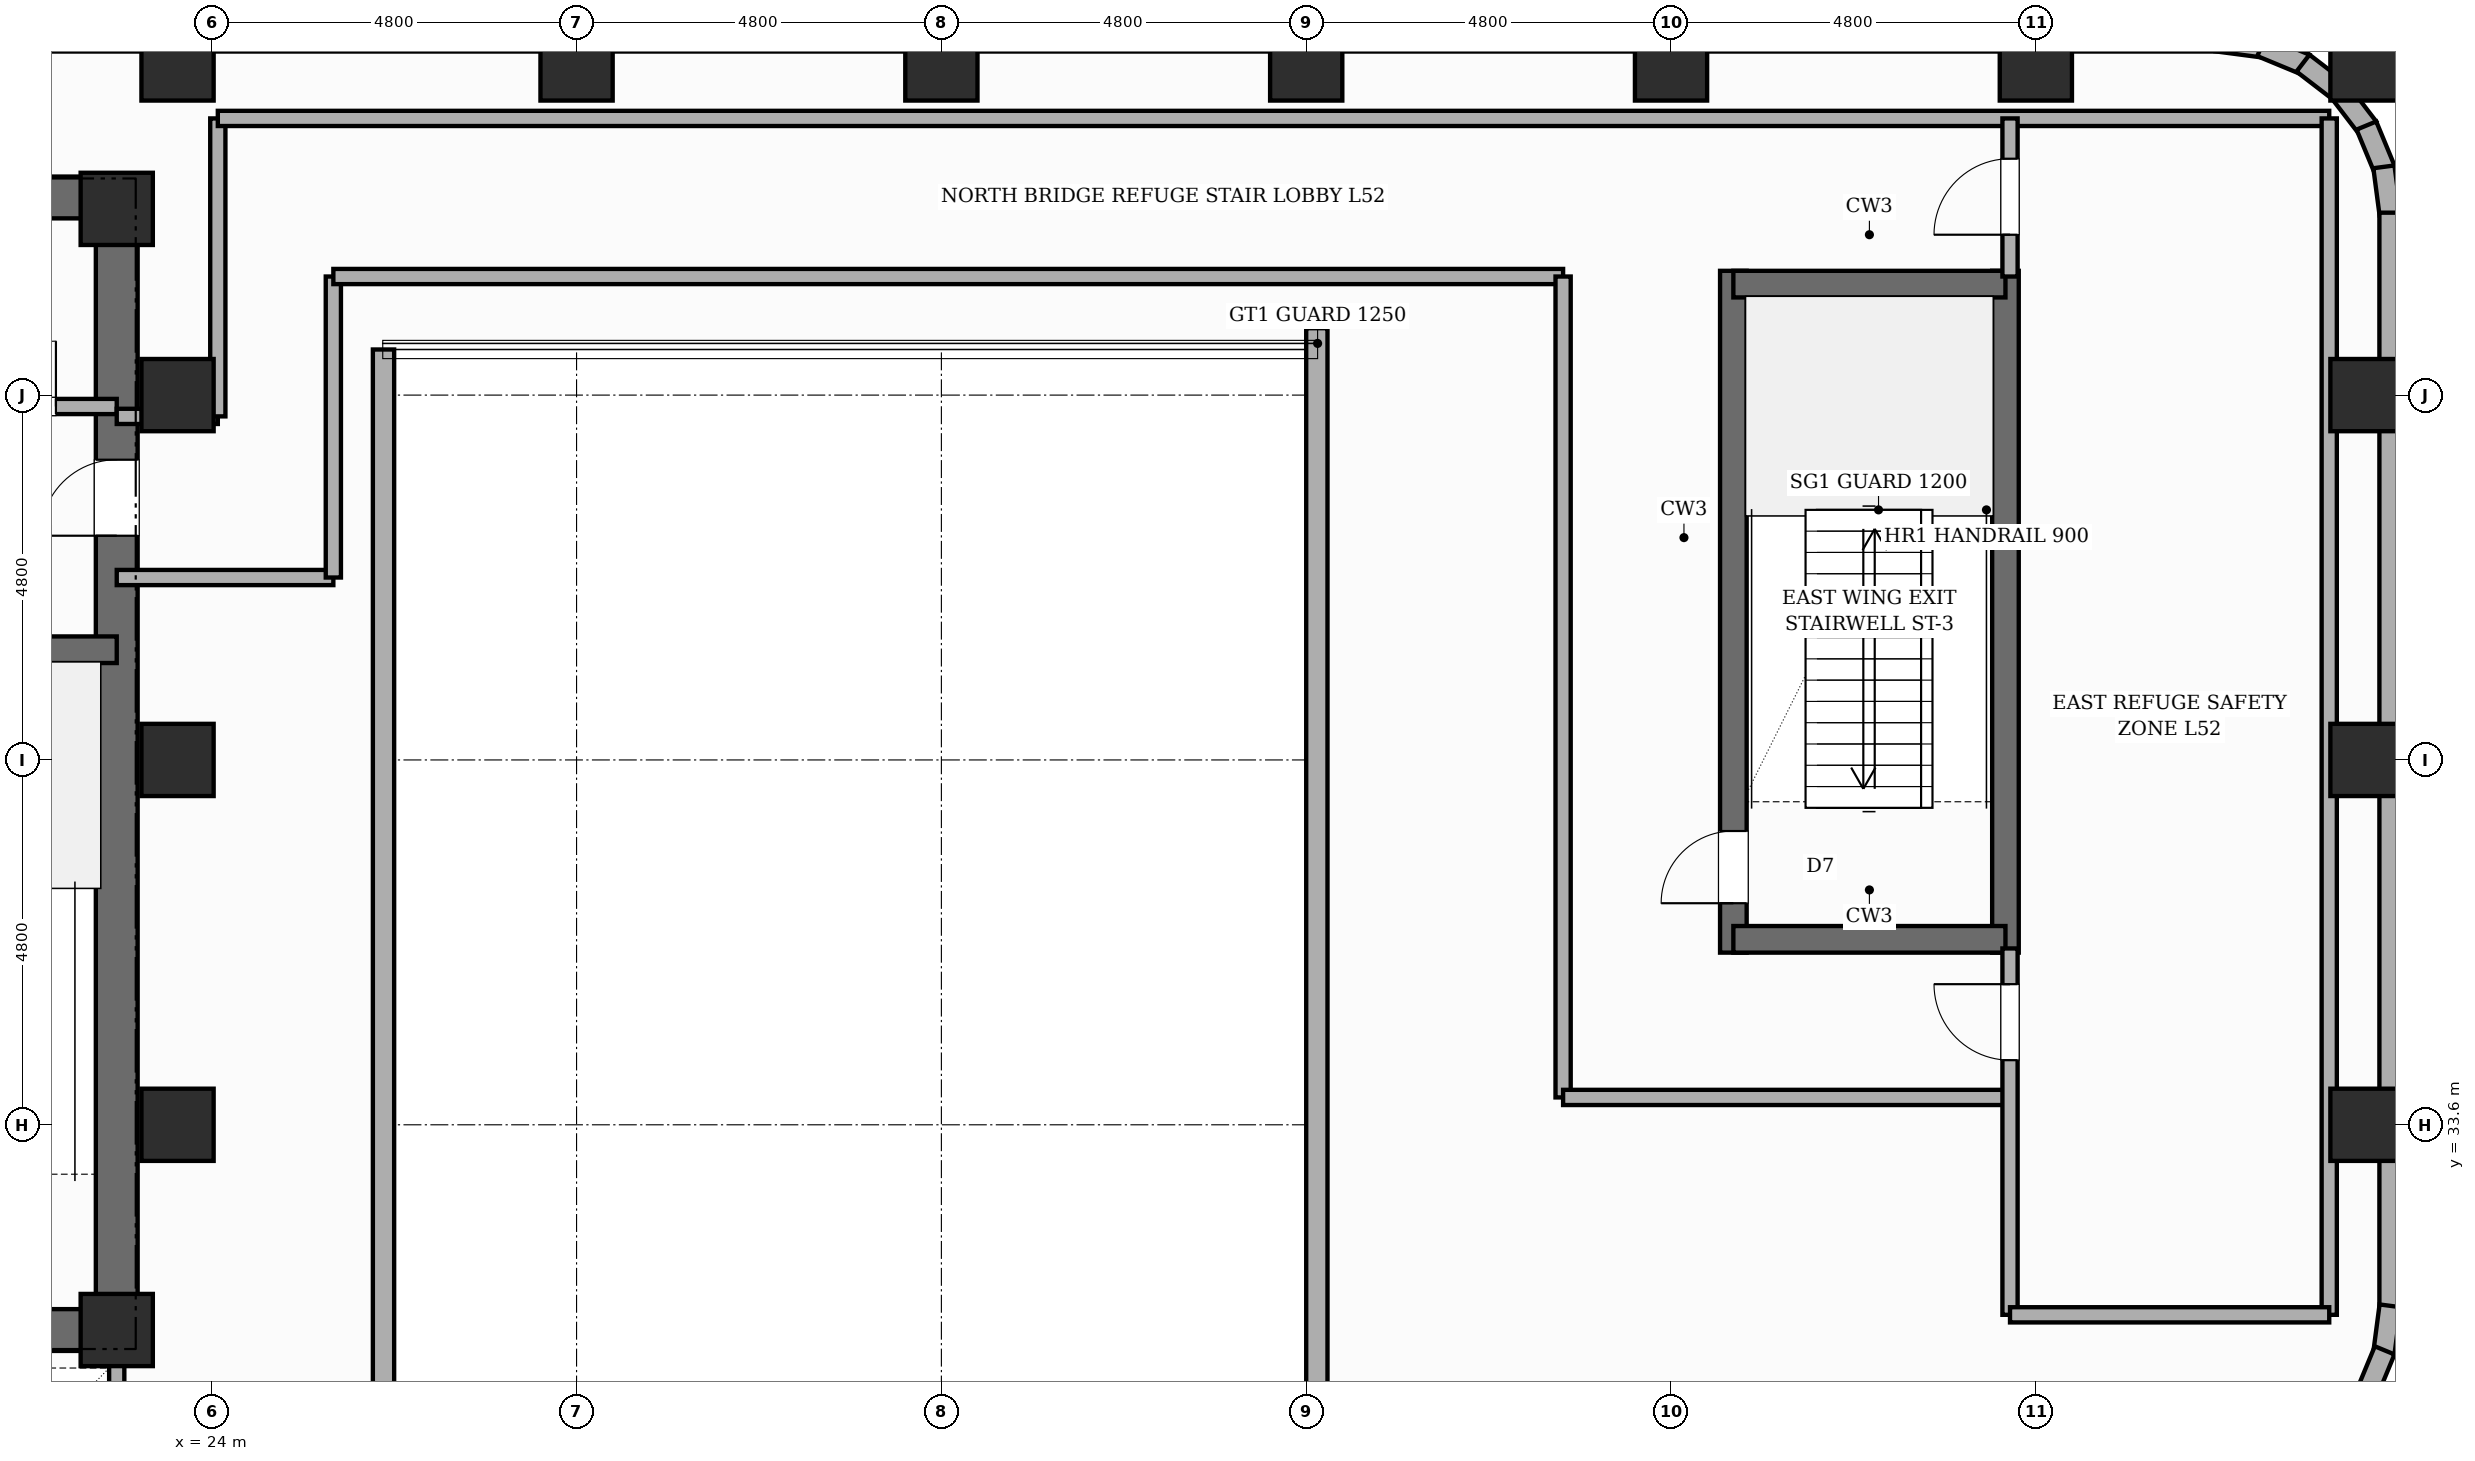
"""IFC4 building model, lengths in metres.
Left out: names, types, materials, properties, quantities, classifications, styles, units other than length and angle.
Written with IfcOpenShell. Run it as: python <this file> out.ifc"""

import sys

from ifc_helpers import new_model, si_unit, direction, frame, frame_2d, origin, origin_2d, place, context, subcontext, project, spatial, rectangle, extrude, element, fill, save


model = new_model("IFC4")
c1 = context("Model", 3, precision=1e-05, world=origin(), true_north=direction((0.0, 1.0)))
c2 = subcontext(c1, "Body", "Model", "MODEL_VIEW")
j1 = project(units=[si_unit("LENGTHUNIT", "METRE"), si_unit("PLANEANGLEUNIT", "RADIAN")], contexts=[c1])
p1 = place(None, origin())
s1 = spatial("IfcSite", under=j1, at=p1, CompositionType="ELEMENT")
p2 = place(p1, origin())
s2 = spatial("IfcBuilding", under=s1, at=p2, CompositionType="ELEMENT")
p3 = place(p2, frame((0.0, 0.0, 198.4)))
s3 = spatial("IfcBuildingStorey", under=s2, at=p3, CompositionType="ELEMENT", Elevation=198.4)
p4 = place(p3, frame((22.75, 30.625, 0.0), z_axis=(0.0, 0.0, 1.0), x_axis=(0.0, 1.0, 0.0)))
e1 = element("IfcWall", 1, at=p4, inside=s3, PredefinedType="SHEAR", context=c2, shape_type="SweptSolid", body=[
    extrude(rectangle(XDim=15.45, YDim=0.55, at=frame_2d((7.725, 0.0))), origin(), (0.0, 0.0, 1.0), 5.4),
])
p5 = place(p4, frame((10.725, 0.0, 0.0)))
e2 = element("IfcOpeningElement", 2, at=p5, cuts=e1, PredefinedType="OPENING", context=c2, shape_type="SweptSolid", body=[
    extrude(rectangle(XDim=1.0, YDim=2.15, at=frame_2d((0.5, 1.075))), frame((0.0, 0.285, 0.0), z_axis=(0.0, -1.0, 0.0), x_axis=(1.0, 0.0, 0.0)), (0.0, 0.0, 1.0), 0.57),
])
p6 = place(p3, frame((6.05, 45.8, 0.0), z_axis=(0.0, 0.0, 1.0), x_axis=(1.0, 0.0, 0.0)))
e3 = element("IfcWall", 3, at=p6, inside=s3, PredefinedType="SHEAR", context=c2, shape_type="SweptSolid", body=[
    extrude(rectangle(XDim=16.7, YDim=0.55, at=frame_2d((8.35, 0.0))), origin(), (0.0, 0.0, 1.0), 5.4),
])
p7 = place(p3, frame((18.84, 30.9, 0.0), z_axis=(0.0, 0.0, 1.0), x_axis=(1.0, 0.0, 0.0)))
e4 = element("IfcWall", 4, at=p7, inside=s3, PredefinedType="SHEAR", context=c2, shape_type="SweptSolid", body=[
    extrude(rectangle(XDim=3.91, YDim=0.55, at=frame_2d((1.955, 0.0))), origin(), (0.0, 0.0, 1.0), 5.4),
])
p8 = place(p3, frame((18.84, 39.85, 0.0), z_axis=(0.0, 0.0, 1.0), x_axis=(1.0, 0.0, 0.0)))
e5 = element("IfcWall", 5, at=p8, inside=s3, PredefinedType="SHEAR", context=c2, shape_type="SweptSolid", body=[
    extrude(rectangle(XDim=3.91, YDim=0.35, at=frame_2d((1.955, 0.0))), origin(), (0.0, 0.0, 1.0), 5.4),
])
p9 = place(p3, frame((44.02, 35.865, 0.0), z_axis=(0.0, 0.0, 1.0), x_axis=(0.0, 1.0, 0.0)))
e6 = element("IfcWall", 6, at=p9, inside=s3, PredefinedType="SHEAR", context=c2, shape_type="SweptSolid", body=[
    extrude(rectangle(XDim=8.97, YDim=0.35, at=frame_2d((4.485, 0.0))), origin(), (0.0, 0.0, 1.0), 5.4),
])
p10 = place(p9, frame((0.65, 0.0, 0.0)))
e7 = element("IfcOpeningElement", 7, at=p10, cuts=e6, PredefinedType="OPENING", context=c2, shape_type="SweptSolid", body=[
    extrude(rectangle(XDim=0.95, YDim=2.1, at=frame_2d((0.475, 1.05))), frame((0.0, 0.185, 0.0), z_axis=(0.0, -1.0, 0.0), x_axis=(1.0, 0.0, 0.0)), (0.0, 0.0, 1.0), 0.37),
])
p11 = place(p3, frame((47.6, 35.865, 0.0), z_axis=(0.0, 0.0, 1.0), x_axis=(0.0, 1.0, 0.0)))
e8 = element("IfcWall", 8, at=p11, inside=s3, PredefinedType="SHEAR", context=c2, shape_type="SweptSolid", body=[
    extrude(rectangle(XDim=8.97, YDim=0.35, at=frame_2d((4.485, 0.0))), origin(), (0.0, 0.0, 1.0), 5.4),
])
for number, where, z_axis, x_axis in (
    (9, (44.02, 36.04, 0.0), (0.0, 0.0, 1.0), (1.0, 0.0, 0.0)),
    (10, (44.02, 44.66, 0.0), (0.0, 0.0, 1.0), (1.0, 0.0, 0.0)),
):
    element("IfcWall", number, at=place(p3, frame(where, z_axis=z_axis, x_axis=x_axis)), inside=s3, PredefinedType="SHEAR", context=c2, shape_type="SweptSolid", body=[
        extrude(rectangle(XDim=3.58, YDim=0.35, at=frame_2d((1.79, 0.0))), origin(), (0.0, 0.0, 1.0), 5.4),
    ])
for number, where, z_axis, x_axis in (
    (11, (22.75, 30.9, 0.0), (0.0, 0.0, 1.0), (1.0, 0.0, 0.0)),
    (12, (22.75, 45.65, 0.0), (0.0, 0.0, 1.0), (1.0, 0.0, 0.0)),
    (13, (23.55, 33.6, 0.0), (0.0, 0.0, 1.0), (1.0, 0.0, 0.0)),
    (14, (23.55, 38.4, 0.0), (0.0, 0.0, 1.0), (1.0, 0.0, 0.0)),
    (15, (23.55, 43.2, 0.0), (0.0, 0.0, 1.0), (1.0, 0.0, 0.0)),
    (16, (23.55, 47.55, 0.0), (0.0, 0.0, 1.0), (1.0, 0.0, 0.0)),
    (17, (28.8, 47.55, 0.0), (0.0, 0.0, 1.0), (1.0, 0.0, 0.0)),
    (18, (33.6, 47.55, 0.0), (0.0, 0.0, 1.0), (1.0, 0.0, 0.0)),
    (19, (38.4, 47.55, 0.0), (0.0, 0.0, 1.0), (1.0, 0.0, 0.0)),
    (20, (43.2, 47.55, 0.0), (0.0, 0.0, 1.0), (1.0, 0.0, 0.0)),
    (21, (48.0, 47.55, 0.0), (0.0, 0.0, 1.0), (1.0, 0.0, 0.0)),
    (22, (52.35, 33.6, 0.0), (0.0, 0.0, 1.0), (1.0, 0.0, 0.0)),
    (23, (52.35, 38.4, 0.0), (0.0, 0.0, 1.0), (1.0, 0.0, 0.0)),
    (24, (52.35, 43.2, 0.0), (0.0, 0.0, 1.0), (1.0, 0.0, 0.0)),
    (25, (52.35, 47.55, 0.0), (0.0, 0.0, 1.0), (1.0, 0.0, 0.0)),
):
    element("IfcColumn", number, at=place(p3, frame(where, z_axis=z_axis, x_axis=x_axis)), inside=s3, PredefinedType="COLUMN", context=c2, shape_type="SweptSolid", body=[
        extrude(rectangle(XDim=0.95, YDim=0.95, at=origin_2d()), origin(), (0.0, 0.0, 1.0), 5.4),
    ])
p12 = place(p3, frame((50.382, 47.861, 0.0), z_axis=(0.0, 0.0, 1.0), x_axis=(0.991447664465, -0.130504898859, 0.0)))
e26 = element("IfcWall", 26, at=p12, inside=s3, PredefinedType="STANDARD", context=c2, shape_type="SweptSolid", body=[
    extrude(rectangle(XDim=0.627, YDim=0.28, at=frame_2d((0.313, 0.0))), origin(), (0.0, 0.0, 1.0), 4.46),
])
for number, where, z_axis, x_axis in (
    (27, (50.968, 47.789, 0.0), (0.0, 0.0, 1.0), (0.924, -0.382, 0.0)),
    (28, (51.515, 47.567, 0.0), (0.0, 0.0, 1.0), (0.793, -0.609, 0.0)),
    (29, (51.986, 47.212, 0.0), (0.0, 0.0, 1.0), (0.609, -0.793, 0.0)),
    (30, (52.349, 46.746, 0.0), (0.0, 0.0, 1.0), (0.383, -0.924, 0.0)),
    (31, (52.579, 46.203, 0.0), (0.0, 0.0, 1.0), (0.131, -0.991, 0.0)),
):
    element("IfcWall", number, at=place(p3, frame(where, z_axis=z_axis, x_axis=x_axis)), inside=s3, PredefinedType="STANDARD", context=c2, shape_type="SweptSolid", body=[
        extrude(rectangle(XDim=0.626, YDim=0.28, at=frame_2d((0.313, 0.0))), origin(), (0.0, 0.0, 1.0), 4.46),
    ])
p13 = place(p3, frame((52.66, 45.6, 0.0), z_axis=(0.0, 0.0, 1.0), x_axis=(0.0, -1.0, 0.0)))
e32 = element("IfcWall", 32, at=p13, inside=s3, PredefinedType="STANDARD", context=c2, shape_type="SweptSolid", body=[
    extrude(rectangle(XDim=14.4, YDim=0.28, at=frame_2d((7.2, 0.0))), origin(), (0.0, 0.0, 1.0), 4.46),
])
p14 = place(p3, frame((52.661, 31.218, 0.0), z_axis=(0.0, 0.0, 1.0), x_axis=(-0.130555323746, -0.9914410257, 0.0)))
e33 = element("IfcWall", 33, at=p14, inside=s3, PredefinedType="STANDARD", context=c2, shape_type="SweptSolid", body=[
    extrude(rectangle(XDim=0.626, YDim=0.28, at=frame_2d((0.313, 0.0))), origin(), (0.0, 0.0, 1.0), 4.46),
])
p15 = place(p3, frame((52.589, 30.632, 0.0), z_axis=(0.0, 0.0, 1.0), x_axis=(-0.382787856107, -0.923836271867, 0.0)))
e34 = element("IfcWall", 34, at=p15, inside=s3, PredefinedType="STANDARD", context=c2, shape_type="SweptSolid", body=[
    extrude(rectangle(XDim=0.626, YDim=0.28, at=frame_2d((0.313, 0.0))), origin(), (0.0, 0.0, 1.0), 4.46),
])
p16 = place(p3, frame((38.54, 28.8, 0.0), z_axis=(0.0, 0.0, 1.0), x_axis=(0.0, 1.0, 0.0)))
e35 = element("IfcWall", 35, at=p16, inside=s3, PredefinedType="STANDARD", context=c2, shape_type="SweptSolid", body=[
    extrude(rectangle(XDim=15.28, YDim=0.28, at=frame_2d((7.64, 0.0))), origin(), (0.0, 0.0, 1.0), 5.18),
])
p17 = place(p3, frame((26.26, 43.8, 0.0), z_axis=(0.0, 0.0, 1.0), x_axis=(0.0, -1.0, 0.0)))
e36 = element("IfcWall", 36, at=p17, inside=s3, PredefinedType="STANDARD", context=c2, shape_type="SweptSolid", body=[
    extrude(rectangle(XDim=15.0, YDim=0.28, at=frame_2d((7.5, 0.0))), origin(), (0.0, 0.0, 1.0), 5.18),
])
p18 = place(p3, frame((18.84, 43.05, 0.0), z_axis=(0.0, 0.0, 1.0), x_axis=(1.0, 0.0, 0.0)))
e37 = element("IfcWall", 37, at=p18, inside=s3, PredefinedType="POLYGONAL", context=c2, shape_type="SweptSolid", body=[
    extrude(rectangle(XDim=3.91, YDim=0.2, at=frame_2d((1.955, 0.0))), origin(), (0.0, 0.0, 1.0), 4.46),
])
p19 = place(p18, frame((0.55, 0.0, 0.0)))
e38 = element("IfcOpeningElement", 38, at=p19, cuts=e37, PredefinedType="OPENING", context=c2, shape_type="SweptSolid", body=[
    extrude(rectangle(XDim=0.88, YDim=2.1, at=frame_2d((0.44, 1.05))), frame((0.0, 0.11, 0.0), z_axis=(0.0, -1.0, 0.0), x_axis=(1.0, 0.0, 0.0)), (0.0, 0.0, 1.0), 0.22),
])
p20 = place(p18, frame((2.25, 0.0, 0.0)))
e39 = element("IfcOpeningElement", 39, at=p20, cuts=e37, PredefinedType="OPENING", context=c2, shape_type="SweptSolid", body=[
    extrude(rectangle(XDim=0.86, YDim=2.1, at=frame_2d((0.43, 1.05))), frame((0.0, 0.11, 0.0), z_axis=(0.0, -1.0, 0.0), x_axis=(1.0, 0.0, 0.0)), (0.0, 0.0, 1.0), 0.22),
])
p21 = place(p3, frame((22.75, 27.9, 0.0), z_axis=(0.0, 0.0, 1.0), x_axis=(0.0, 1.0, 0.0)))
e40 = element("IfcWall", 40, at=p21, inside=s3, PredefinedType="POLYGONAL", context=c2, shape_type="SweptSolid", body=[
    extrude(rectangle(XDim=3.0, YDim=0.2, at=frame_2d((1.5, 0.0))), origin(), (0.0, 0.0, 1.0), 5.18),
])
p22 = place(p3, frame((22.75, 40.8, 0.0), z_axis=(0.0, 0.0, 1.0), x_axis=(1.0, 0.0, 0.0)))
e41 = element("IfcWall", 41, at=p22, inside=s3, PredefinedType="PARTITIONING", context=c2, shape_type="SweptSolid", body=[
    extrude(rectangle(XDim=2.85, YDim=0.2, at=frame_2d((1.425, 0.0))), origin(), (0.0, 0.0, 1.0), 5.18),
])
p23 = place(p3, frame((22.75, 42.92, 0.0), z_axis=(0.0, 0.0, 1.0), x_axis=(1.0, 0.0, 0.0)))
e42 = element("IfcWall", 42, at=p23, inside=s3, PredefinedType="PARTITIONING", context=c2, shape_type="SweptSolid", body=[
    extrude(rectangle(XDim=1.33, YDim=0.2, at=frame_2d((0.665, 0.0))), origin(), (0.0, 0.0, 1.0), 4.46),
])
p24 = place(p3, frame((24.08, 42.92, 0.0), z_axis=(0.0, 0.0, 1.0), x_axis=(0.0, 1.0, 0.0)))
e43 = element("IfcWall", 43, at=p24, inside=s3, PredefinedType="PARTITIONING", context=c2, shape_type="SweptSolid", body=[
    extrude(rectangle(XDim=3.92, YDim=0.2, at=frame_2d((1.96, 0.0))), origin(), (0.0, 0.0, 1.0), 5.18),
])
p25 = place(p3, frame((25.6, 40.8, 0.0), z_axis=(0.0, 0.0, 1.0), x_axis=(0.0, 1.0, 0.0)))
e44 = element("IfcWall", 44, at=p25, inside=s3, PredefinedType="PARTITIONING", context=c2, shape_type="SweptSolid", body=[
    extrude(rectangle(XDim=3.96, YDim=0.2, at=frame_2d((1.98, 0.0))), origin(), (0.0, 0.0, 1.0), 5.18),
])
p26 = place(p3, frame((24.08, 46.84, 0.0), z_axis=(0.0, 0.0, 1.0), x_axis=(1.0, 0.0, 0.0)))
e45 = element("IfcWall", 45, at=p26, inside=s3, PredefinedType="PARTITIONING", context=c2, shape_type="SweptSolid", body=[
    extrude(rectangle(XDim=27.78, YDim=0.2, at=frame_2d((13.89, 0.0))), origin(), (0.0, 0.0, 1.0), 5.18),
])
p27 = place(p3, frame((25.6, 44.76, 0.0), z_axis=(0.0, 0.0, 1.0), x_axis=(1.0, 0.0, 0.0)))
e46 = element("IfcWall", 46, at=p27, inside=s3, PredefinedType="PARTITIONING", context=c2, shape_type="SweptSolid", body=[
    extrude(rectangle(XDim=16.18, YDim=0.2, at=frame_2d((8.09, 0.0))), origin(), (0.0, 0.0, 1.0), 5.18),
])
p28 = place(p3, frame((41.78, 33.96, 0.0), z_axis=(0.0, 0.0, 1.0), x_axis=(0.0, 1.0, 0.0)))
e47 = element("IfcWall", 47, at=p28, inside=s3, PredefinedType="PARTITIONING", context=c2, shape_type="SweptSolid", body=[
    extrude(rectangle(XDim=10.8, YDim=0.2, at=frame_2d((5.4, 0.0))), origin(), (0.0, 0.0, 1.0), 5.18),
])
p29 = place(p3, frame((41.78, 33.96, 0.0), z_axis=(0.0, 0.0, 1.0), x_axis=(1.0, 0.0, 0.0)))
e48 = element("IfcWall", 48, at=p29, inside=s3, PredefinedType="PARTITIONING", context=c2, shape_type="SweptSolid", body=[
    extrude(rectangle(XDim=5.88, YDim=0.2, at=frame_2d((2.94, 0.0))), origin(), (0.0, 0.0, 1.0), 5.18),
])
p30 = place(p3, frame((47.66, 44.76, 0.0), z_axis=(0.0, 0.0, 1.0), x_axis=(0.0, 1.0, 0.0)))
e49 = element("IfcWall", 49, at=p30, inside=s3, PredefinedType="PARTITIONING", context=c2, shape_type="SweptSolid", body=[
    extrude(rectangle(XDim=2.08, YDim=0.2, at=frame_2d((1.04, 0.0))), origin(), (0.0, 0.0, 1.0), 5.18),
])
p31 = place(p30, frame((0.55, 0.0, 0.0)))
e50 = element("IfcOpeningElement", 50, at=p31, cuts=e49, PredefinedType="OPENING", context=c2, shape_type="SweptSolid", body=[
    extrude(rectangle(XDim=1.0, YDim=2.15, at=frame_2d((0.5, 1.075))), frame((0.0, 0.11, 0.0), z_axis=(0.0, -1.0, 0.0), x_axis=(1.0, 0.0, 0.0)), (0.0, 0.0, 1.0), 0.22),
])
p32 = place(p3, frame((47.66, 31.1, 0.0), z_axis=(0.0, 0.0, 1.0), x_axis=(0.0, 1.0, 0.0)))
e51 = element("IfcWall", 51, at=p32, inside=s3, PredefinedType="PARTITIONING", context=c2, shape_type="SweptSolid", body=[
    extrude(rectangle(XDim=4.82, YDim=0.2, at=frame_2d((2.41, 0.0))), origin(), (0.0, 0.0, 1.0), 5.18),
])
p33 = place(p32, frame((3.35, 0.0, 0.0)))
e52 = element("IfcOpeningElement", 52, at=p33, cuts=e51, PredefinedType="OPENING", context=c2, shape_type="SweptSolid", body=[
    extrude(rectangle(XDim=1.0, YDim=2.15, at=frame_2d((0.5, 1.075))), frame((0.0, 0.11, 0.0), z_axis=(0.0, -1.0, 0.0), x_axis=(1.0, 0.0, 0.0)), (0.0, 0.0, 1.0), 0.22),
])
p34 = place(p3, frame((51.86, 31.1, 0.0), z_axis=(0.0, 0.0, 1.0), x_axis=(0.0, 1.0, 0.0)))
e53 = element("IfcWall", 53, at=p34, inside=s3, PredefinedType="PARTITIONING", context=c2, shape_type="SweptSolid", body=[
    extrude(rectangle(XDim=15.74, YDim=0.2, at=frame_2d((7.87, 0.0))), origin(), (0.0, 0.0, 1.0), 5.18),
])
p35 = place(p3, frame((47.66, 31.1, 0.0), z_axis=(0.0, 0.0, 1.0), x_axis=(1.0, 0.0, 0.0)))
e54 = element("IfcWall", 54, at=p35, inside=s3, PredefinedType="PARTITIONING", context=c2, shape_type="SweptSolid", body=[
    extrude(rectangle(XDim=4.2, YDim=0.2, at=frame_2d((2.1, 0.0))), origin(), (0.0, 0.0, 1.0), 5.18),
])
p36 = place(p10, origin())
e55 = element("IfcDoor", 55, at=p36, inside=s3, OperationType="SINGLE_SWING_LEFT", PredefinedType="DOOR", context=c2, shape_type="SweptSolid", body=[
    extrude(rectangle(XDim=0.95, YDim=2.1, at=frame_2d((0.475, 1.05))), frame((0.0, 0.025, 0.0), z_axis=(0.0, -1.0, 0.0), x_axis=(1.0, 0.0, 0.0)), (0.0, 0.0, 1.0), 0.05),
])
fill(e7, e55)
p37 = place(p5, origin())
e56 = element("IfcDoor", 56, at=p37, inside=s3, OperationType="SINGLE_SWING_LEFT", PredefinedType="DOOR", context=c2, shape_type="SweptSolid", body=[
    extrude(rectangle(XDim=1.0, YDim=2.15, at=frame_2d((0.5, 1.075))), frame((0.0, 0.025, 0.0), z_axis=(0.0, -1.0, 0.0), x_axis=(1.0, 0.0, 0.0)), (0.0, 0.0, 1.0), 0.05),
])
fill(e2, e56)
p38 = place(p20, origin())
e57 = element("IfcDoor", 57, at=p38, inside=s3, OperationType="SINGLE_SWING_RIGHT", PredefinedType="DOOR", context=c2, shape_type="SweptSolid", body=[
    extrude(rectangle(XDim=0.86, YDim=2.1, at=frame_2d((0.43, 1.05))), frame((0.0, 0.025, 0.0), z_axis=(0.0, -1.0, 0.0), x_axis=(1.0, 0.0, 0.0)), (0.0, 0.0, 1.0), 0.05),
])
fill(e39, e57)
p39 = place(p31, origin())
e58 = element("IfcDoor", 58, at=p39, inside=s3, OperationType="SINGLE_SWING_LEFT", PredefinedType="DOOR", context=c2, shape_type="SweptSolid", body=[
    extrude(rectangle(XDim=1.0, YDim=2.15, at=frame_2d((0.5, 1.075))), frame((0.0, 0.025, 0.0), z_axis=(0.0, -1.0, 0.0), x_axis=(1.0, 0.0, 0.0)), (0.0, 0.0, 1.0), 0.05),
])
fill(e50, e58)
p40 = place(p33, origin())
e59 = element("IfcDoor", 59, at=p40, inside=s3, OperationType="SINGLE_SWING_RIGHT", PredefinedType="DOOR", context=c2, shape_type="SweptSolid", body=[
    extrude(rectangle(XDim=1.0, YDim=2.15, at=frame_2d((0.5, 1.075))), frame((0.0, 0.025, 0.0), z_axis=(0.0, -1.0, 0.0), x_axis=(1.0, 0.0, 0.0)), (0.0, 0.0, 1.0), 0.05),
])
fill(e52, e59)
save(model, sys.argv[1])
